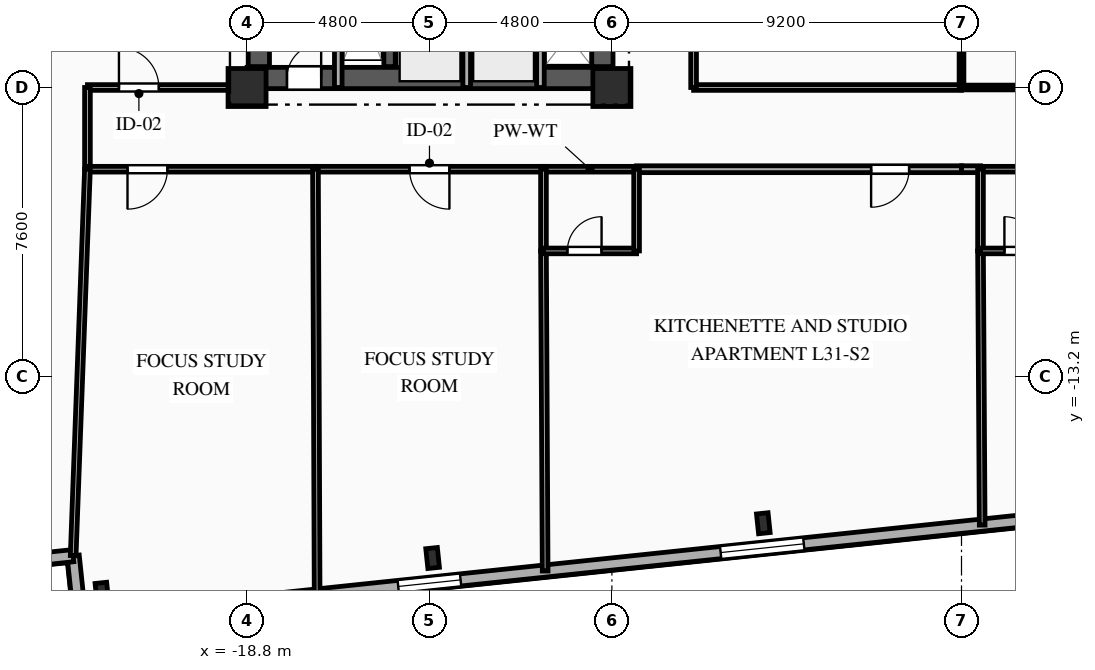
"""IFC4 building model, lengths in metres.
Left out: names, types, materials, properties, quantities, classifications, styles, units other than length and angle.
Written with IfcOpenShell. Run it as: python <this file> out.ifc"""

import sys

from ifc_helpers import new_model, si_unit, direction, frame, frame_2d, origin, origin_2d, place, context, subcontext, project, spatial, rectangle, i_section, extrude, element, fill, save


model = new_model("IFC4")
c1 = context("Model", 3, precision=1e-05, world=origin(), true_north=direction((0.0, 1.0)))
c2 = subcontext(c1, "Body", "Model", "MODEL_VIEW")
j1 = project(units=[si_unit("LENGTHUNIT", "METRE"), si_unit("PLANEANGLEUNIT", "RADIAN")], contexts=[c1])
p1 = place(None, origin())
s1 = spatial("IfcSite", under=j1, at=p1, CompositionType="ELEMENT")
p2 = place(p1, origin())
s2 = spatial("IfcBuilding", under=s1, at=p2, CompositionType="ELEMENT")
p3 = place(p2, frame((0.0, 0.0, 112.5)))
s3 = spatial("IfcBuildingStorey", under=s2, at=p3, CompositionType="ELEMENT", Elevation=112.5)
for number, where, z_axis, x_axis in (
    (1, (-18.8, -5.6, 0.0), (0.0, 0.0, 1.0), (1.0, 0.0, 0.0)),
    (2, (-9.2, -5.6, 0.0), (0.0, 0.0, 1.0), (1.0, 0.0, 0.0)),
):
    element("IfcColumn", number, at=place(p3, frame(where, z_axis=z_axis, x_axis=x_axis)), inside=s3, PredefinedType="COLUMN", context=c2, shape_type="SweptSolid", body=[
        extrude(rectangle(XDim=1.0, YDim=1.0, at=origin_2d()), origin(), (0.0, 0.0, 1.0), 3.35),
    ])
for number, where, z_axis, x_axis in (
    (3, (-22.619, -18.895, 0.0), (0.0, 0.0, 1.0), (0.995, 0.105, 0.0)),
    (4, (-13.917, -17.98, 0.0), (0.0, 0.0, 1.0), (0.995, 0.105, 0.0)),
    (5, (-5.215, -17.066, 0.0), (0.0, 0.0, 1.0), (0.995, 0.105, 0.0)),
):
    element("IfcColumn", number, at=place(p3, frame(where, z_axis=z_axis, x_axis=x_axis)), inside=s3, PredefinedType="COLUMN", context=c2, shape_type="SweptSolid", body=[
        extrude(i_section(OverallWidth=0.306, OverallDepth=0.524, WebThickness=0.021, FlangeThickness=0.04, FilletRadius=0.027, at=origin_2d()), origin(), (0.0, 0.0, 1.0), 3.35),
    ])
for number, where, z_axis, x_axis in (
    (6, (-23.198, -19.609, 0.0), (0.0, 0.0, 1.0), (-0.105, 0.995, 0.0)),
    (7, (-23.376, -17.919, 0.0), (0.0, 0.0, 1.0), (-0.995, -0.105, 0.0)),
):
    element("IfcWall", number, at=place(p3, frame(where, z_axis=z_axis, x_axis=x_axis)), inside=s3, PredefinedType="SOLIDWALL", context=c2, shape_type="SweptSolid", body=[
        extrude(rectangle(XDim=1.7, YDim=0.32, at=frame_2d((0.85, 0.0))), origin(), (0.0, 0.0, 1.0), 3.045),
    ])
p4 = place(p3, frame((30.307, -13.986, 0.0), z_axis=(0.0, 0.0, 1.0), x_axis=(-0.994521628355, -0.104531003701, 0.0)))
e8 = element("IfcWall", 8, at=p4, inside=s3, PredefinedType="SOLIDWALL", context=c2, shape_type="SweptSolid", body=[
    extrude(rectangle(XDim=53.8, YDim=0.32, at=frame_2d((26.9, 0.0))), origin(), (0.0, 0.0, 1.0), 3.045),
])
p5 = place(p4, frame((3.098, 0.0, 0.85)))
e9 = element("IfcOpeningElement", 9, at=p5, cuts=e8, PredefinedType="OPENING", context=c2, shape_type="SweptSolid", body=[
    extrude(rectangle(XDim=1.65, YDim=1.85, at=frame_2d((0.825, 0.925))), frame((0.0, 0.17, 0.0), z_axis=(0.0, -1.0, 0.0), x_axis=(1.0, 0.0, 0.0)), (0.0, 0.0, 1.0), 0.34),
])
p6 = place(p4, frame((9.302, 0.0, 0.85)))
e10 = element("IfcOpeningElement", 10, at=p6, cuts=e8, PredefinedType="OPENING", context=c2, shape_type="SweptSolid", body=[
    extrude(rectangle(XDim=1.65, YDim=1.85, at=frame_2d((0.825, 0.925))), frame((0.0, 0.17, 0.0), z_axis=(0.0, -1.0, 0.0), x_axis=(1.0, 0.0, 0.0)), (0.0, 0.0, 1.0), 0.34),
])
p7 = place(p4, frame((14.827, 0.0, 0.85)))
e11 = element("IfcOpeningElement", 11, at=p7, cuts=e8, PredefinedType="OPENING", context=c2, shape_type="SweptSolid", body=[
    extrude(rectangle(XDim=1.65, YDim=1.85, at=frame_2d((0.825, 0.925))), frame((0.0, 0.17, 0.0), z_axis=(0.0, -1.0, 0.0), x_axis=(1.0, 0.0, 0.0)), (0.0, 0.0, 1.0), 0.34),
])
p8 = place(p4, frame((23.078, 0.0, 0.85)))
e12 = element("IfcOpeningElement", 12, at=p8, cuts=e8, PredefinedType="OPENING", context=c2, shape_type="SweptSolid", body=[
    extrude(rectangle(XDim=2.2, YDim=1.85, at=frame_2d((1.1, 0.925))), frame((0.0, 0.17, 0.0), z_axis=(0.0, -1.0, 0.0), x_axis=(1.0, 0.0, 0.0)), (0.0, 0.0, 1.0), 0.34),
])
p9 = place(p4, frame((34.646, 0.0, 0.85)))
e13 = element("IfcOpeningElement", 13, at=p9, cuts=e8, PredefinedType="OPENING", context=c2, shape_type="SweptSolid", body=[
    extrude(rectangle(XDim=2.2, YDim=1.85, at=frame_2d((1.1, 0.925))), frame((0.0, 0.17, 0.0), z_axis=(0.0, -1.0, 0.0), x_axis=(1.0, 0.0, 0.0)), (0.0, 0.0, 1.0), 0.34),
])
p10 = place(p4, frame((43.728, 0.0, 0.85)))
e14 = element("IfcOpeningElement", 14, at=p10, cuts=e8, PredefinedType="OPENING", context=c2, shape_type="SweptSolid", body=[
    extrude(rectangle(XDim=1.65, YDim=1.85, at=frame_2d((0.825, 0.925))), frame((0.0, 0.17, 0.0), z_axis=(0.0, -1.0, 0.0), x_axis=(1.0, 0.0, 0.0)), (0.0, 0.0, 1.0), 0.34),
])
p11 = place(p4, frame((49.653, 0.0, 0.85)))
e15 = element("IfcOpeningElement", 15, at=p11, cuts=e8, PredefinedType="OPENING", context=c2, shape_type="SweptSolid", body=[
    extrude(rectangle(XDim=1.65, YDim=1.85, at=frame_2d((0.825, 0.925))), frame((0.0, 0.17, 0.0), z_axis=(0.0, -1.0, 0.0), x_axis=(1.0, 0.0, 0.0)), (0.0, 0.0, 1.0), 0.34),
])
p12 = place(p3, frame((-18.8, -5.35, 0.0), z_axis=(0.0, 0.0, 1.0), x_axis=(1.0, 0.0, 0.0)))
e16 = element("IfcWall", 16, at=p12, inside=s3, PredefinedType="SHEAR", context=c2, shape_type="SweptSolid", body=[
    extrude(rectangle(XDim=9.6, YDim=0.56, at=frame_2d((4.8, 0.0))), origin(), (0.0, 0.0, 1.0), 3.045),
])
p13 = place(p12, frame((1.05, 0.0, 0.0)))
e17 = element("IfcOpeningElement", 17, at=p13, cuts=e16, PredefinedType="OPENING", context=c2, shape_type="SweptSolid", body=[
    extrude(rectangle(XDim=0.9, YDim=2.1, at=frame_2d((0.45, 1.05))), frame((0.0, 0.29, 0.0), z_axis=(0.0, -1.0, 0.0), x_axis=(1.0, 0.0, 0.0)), (0.0, 0.0, 1.0), 0.58),
])
p14 = place(p3, frame((-18.49, -5.05, 0.0), z_axis=(0.0, 0.0, 1.0), x_axis=(0.0, 1.0, 0.0)))
e18 = element("IfcWall", 18, at=p14, inside=s3, PredefinedType="SHEAR", context=c2, shape_type="SweptSolid", body=[
    extrude(rectangle(XDim=10.1, YDim=0.56, at=frame_2d((5.05, 0.0))), origin(), (0.0, 0.0, 1.0), 3.045),
])
p15 = place(p3, frame((-9.45, -5.05, 0.0), z_axis=(0.0, 0.0, 1.0), x_axis=(0.0, 1.0, 0.0)))
e19 = element("IfcWall", 19, at=p15, inside=s3, PredefinedType="SHEAR", context=c2, shape_type="SweptSolid", body=[
    extrude(rectangle(XDim=10.1, YDim=0.56, at=frame_2d((5.05, 0.0))), origin(), (0.0, 0.0, 1.0), 3.045),
])
p16 = place(p15, frame((7.15, 0.0, 0.0)))
e20 = element("IfcOpeningElement", 20, at=p16, cuts=e19, PredefinedType="OPENING", context=c2, shape_type="SweptSolid", body=[
    extrude(rectangle(XDim=0.9, YDim=2.1, at=frame_2d((0.45, 1.05))), frame((0.0, 0.29, 0.0), z_axis=(0.0, -1.0, 0.0), x_axis=(1.0, 0.0, 0.0)), (0.0, 0.0, 1.0), 0.58),
])
p17 = place(p15, frame((2.4, 0.0, 0.0)))
e21 = element("IfcOpeningElement", 21, at=p17, cuts=e19, PredefinedType="OPENING", context=c2, shape_type="SweptSolid", body=[
    extrude(rectangle(XDim=1.2, YDim=2.15, at=frame_2d((0.6, 1.075))), frame((0.0, 0.29, 0.0), z_axis=(0.0, -1.0, 0.0), x_axis=(1.0, 0.0, 0.0)), (0.0, 0.0, 1.0), 0.58),
])
p18 = place(p3, frame((-15.05, -5.05, 0.0), z_axis=(0.0, 0.0, 1.0), x_axis=(0.0, 1.0, 0.0)))
e22 = element("IfcWall", 22, at=p18, inside=s3, PredefinedType="SHEAR", context=c2, shape_type="SweptSolid", body=[
    extrude(rectangle(XDim=10.1, YDim=0.3, at=frame_2d((5.05, 0.0))), origin(), (0.0, 0.0, 1.0), 3.045),
])
p19 = place(p3, frame((-16.4, -5.6, 0.0), z_axis=(0.0, 0.0, 1.0), x_axis=(0.0, 1.0, 0.0)))
e23 = element("IfcWall", 23, at=p19, inside=s3, PredefinedType="PARTITIONING", context=c2, shape_type="SweptSolid", body=[
    extrude(rectangle(XDim=3.49, YDim=0.2, at=frame_2d((1.745, 0.0))), origin(), (0.0, 0.0, 1.0), 3.045),
])
for number, where, z_axis, x_axis in (
    (24, (-13.02, -5.6, 0.0), (0.0, 0.0, 1.0), (0.0, 1.0, 0.0)),
    (25, (-11.08, -5.6, 0.0), (0.0, 0.0, 1.0), (0.0, 1.0, 0.0)),
):
    element("IfcWall", number, at=place(p3, frame(where, z_axis=z_axis, x_axis=x_axis)), inside=s3, PredefinedType="PARTITIONING", context=c2, shape_type="SweptSolid", body=[
        extrude(rectangle(XDim=2.25, YDim=0.2, at=frame_2d((1.125, 0.0))), origin(), (0.0, 0.0, 1.0), 3.045),
    ])
p20 = place(p3, frame((-23.0, -5.6, 0.0), z_axis=(0.0, 0.0, 1.0), x_axis=(1.0, 0.0, 0.0)))
e26 = element("IfcWall", 26, at=p20, inside=s3, PredefinedType="PARTITIONING", context=c2, shape_type="SweptSolid", body=[
    extrude(rectangle(XDim=4.2, YDim=0.15, at=frame_2d((2.1, 0.0))), origin(), (0.0, 0.0, 1.0), 3.045),
])
p21 = place(p20, frame((0.829, 0.0, 0.0)))
e27 = element("IfcOpeningElement", 27, at=p21, cuts=e26, PredefinedType="OPENING", context=c2, shape_type="SweptSolid", body=[
    extrude(rectangle(XDim=1.05, YDim=2.15, at=frame_2d((0.525, 1.075))), frame((0.0, 0.085, 0.0), z_axis=(0.0, -1.0, 0.0), x_axis=(1.0, 0.0, 0.0)), (0.0, 0.0, 1.0), 0.17),
])
p22 = place(p3, frame((-23.0, -7.75, 0.0), z_axis=(0.0, 0.0, 1.0), x_axis=(0.0, 1.0, 0.0)))
e28 = element("IfcWall", 28, at=p22, inside=s3, PredefinedType="PARTITIONING", context=c2, shape_type="SweptSolid", body=[
    extrude(rectangle(XDim=2.15, YDim=0.15, at=frame_2d((1.075, 0.0))), origin(), (0.0, 0.0, 1.0), 2.7),
])
p23 = place(p3, frame((-17.0, -7.75, 0.0), z_axis=(0.0, 0.0, 1.0), x_axis=(-1.0, 0.0, 0.0)))
e29 = element("IfcWall", 29, at=p23, inside=s3, PredefinedType="PARTITIONING", context=c2, shape_type="SweptSolid", body=[
    extrude(rectangle(XDim=6.0, YDim=0.15, at=frame_2d((3.0, 0.0))), origin(), (0.0, 0.0, 1.0), 3.045),
])
p24 = place(p23, frame((3.896, 0.0, 0.0)))
e30 = element("IfcOpeningElement", 30, at=p24, cuts=e29, PredefinedType="OPENING", context=c2, shape_type="SweptSolid", body=[
    extrude(rectangle(XDim=1.05, YDim=2.15, at=frame_2d((0.525, 1.075))), frame((0.0, 0.085, 0.0), z_axis=(0.0, -1.0, 0.0), x_axis=(1.0, 0.0, 0.0)), (0.0, 0.0, 1.0), 0.17),
])
p25 = place(p3, frame((-11.0, -7.75, 0.0), z_axis=(0.0, 0.0, 1.0), x_axis=(-1.0, 0.0, 0.0)))
e31 = element("IfcWall", 31, at=p25, inside=s3, PredefinedType="PARTITIONING", context=c2, shape_type="SweptSolid", body=[
    extrude(rectangle(XDim=6.0, YDim=0.15, at=frame_2d((3.0, 0.0))), origin(), (0.0, 0.0, 1.0), 3.045),
])
p26 = place(p25, frame((2.475, 0.0, 0.0)))
e32 = element("IfcOpeningElement", 32, at=p26, cuts=e31, PredefinedType="OPENING", context=c2, shape_type="SweptSolid", body=[
    extrude(rectangle(XDim=1.05, YDim=2.15, at=frame_2d((0.525, 1.075))), frame((0.0, 0.085, 0.0), z_axis=(0.0, -1.0, 0.0), x_axis=(1.0, 0.0, 0.0)), (0.0, 0.0, 1.0), 0.17),
])
p27 = place(p3, frame((0.0, -7.75, 0.0), z_axis=(0.0, 0.0, 1.0), x_axis=(-1.0, 0.0, 0.0)))
e33 = element("IfcWall", 33, at=p27, inside=s3, PredefinedType="PARTITIONING", context=c2, shape_type="SweptSolid", body=[
    extrude(rectangle(XDim=8.55, YDim=0.18, at=frame_2d((4.275, 0.0))), origin(), (0.0, 0.0, 1.0), 3.045),
])
p28 = place(p27, frame((1.379, 0.0, 0.0)))
e34 = element("IfcOpeningElement", 34, at=p28, cuts=e33, PredefinedType="OPENING", context=c2, shape_type="SweptSolid", body=[
    extrude(rectangle(XDim=1.0, YDim=2.15, at=frame_2d((0.5, 1.075))), frame((0.0, 0.1, 0.0), z_axis=(0.0, -1.0, 0.0), x_axis=(1.0, 0.0, 0.0)), (0.0, 0.0, 1.0), 0.2),
])
p29 = place(p3, frame((-8.55, -7.75, 0.0), z_axis=(0.0, 0.0, 1.0), x_axis=(-1.0, 0.0, 0.0)))
e35 = element("IfcWall", 35, at=p29, inside=s3, PredefinedType="PLUMBINGWALL", context=c2, shape_type="SweptSolid", body=[
    extrude(rectangle(XDim=2.45, YDim=0.15, at=frame_2d((1.225, 0.0))), origin(), (0.0, 0.0, 1.0), 3.045),
])
p30 = place(p3, frame((-7.05, -5.6, 0.0), z_axis=(0.0, 0.0, 1.0), x_axis=(1.0, 0.0, 0.0)))
e36 = element("IfcWall", 36, at=p30, inside=s3, PredefinedType="PARTITIONING", context=c2, shape_type="SweptSolid", body=[
    extrude(rectangle(XDim=7.05, YDim=0.15, at=frame_2d((3.525, 0.0))), origin(), (0.0, 0.0, 1.0), 2.53),
])
p31 = place(p3, frame((0.5, -7.75, 0.0), z_axis=(0.0, 0.0, 1.0), x_axis=(-1.0, 0.0, 0.0)))
e37 = element("IfcWall", 37, at=p31, inside=s3, PredefinedType="PARTITIONING", context=c2, shape_type="SweptSolid", body=[
    extrude(rectangle(XDim=0.5, YDim=0.18, at=frame_2d((0.25, 0.0))), origin(), (0.0, 0.0, 1.0), 3.045),
])
p32 = place(p3, frame((2.95, -7.75, 0.0), z_axis=(0.0, 0.0, 1.0), x_axis=(-1.0, 0.0, 0.0)))
e38 = element("IfcWall", 38, at=p32, inside=s3, PredefinedType="PLUMBINGWALL", context=c2, shape_type="SweptSolid", body=[
    extrude(rectangle(XDim=2.45, YDim=0.15, at=frame_2d((1.225, 0.0))), origin(), (0.0, 0.0, 1.0), 3.045),
])
p33 = place(p3, frame((0.0, -5.6, 0.0), z_axis=(0.0, 0.0, 1.0), x_axis=(1.0, 0.0, 0.0)))
e39 = element("IfcWall", 39, at=p33, inside=s3, PredefinedType="PARTITIONING", context=c2, shape_type="SweptSolid", body=[
    extrude(rectangle(XDim=7.05, YDim=0.125, at=frame_2d((3.525, 0.0))), origin(), (0.0, 0.0, 1.0), 2.53),
])
p34 = place(p3, frame((-7.05, 8.5, 0.0), z_axis=(0.0, 0.0, 1.0), x_axis=(0.0, -1.0, 0.0)))
e40 = element("IfcWall", 40, at=p34, inside=s3, PredefinedType="PARTITIONING", context=c2, shape_type="SweptSolid", body=[
    extrude(rectangle(XDim=14.1, YDim=0.15, at=frame_2d((7.05, 0.0))), origin(), (0.0, 0.0, 1.0), 3.045),
])
p35 = place(p34, frame((8.074, 0.0, 0.0)))
e41 = element("IfcOpeningElement", 41, at=p35, cuts=e40, PredefinedType="OPENING", context=c2, shape_type="SweptSolid", body=[
    extrude(rectangle(XDim=0.95, YDim=2.1, at=frame_2d((0.475, 1.05))), frame((0.0, 0.085, 0.0), z_axis=(0.0, -1.0, 0.0), x_axis=(1.0, 0.0, 0.0)), (0.0, 0.0, 1.0), 0.17),
])
p36 = place(p3, frame((-23.0, -7.75, 0.0), z_axis=(0.0, 0.0, 1.0), x_axis=(-0.036924695214, -0.999318050914, 0.0)))
e42 = element("IfcWall", 42, at=p36, inside=s3, PredefinedType="PARTITIONING", context=c2, shape_type="SweptSolid", body=[
    extrude(rectangle(XDim=10.176, YDim=0.15, at=frame_2d((5.088, 0.0))), origin(), (0.0, 0.0, 1.0), 3.045),
])
p37 = place(p3, frame((-17.0, -7.75, 0.0), z_axis=(0.0, 0.0, 1.0), x_axis=(0.003922478487, -0.999992307052, 0.0)))
e43 = element("IfcWall", 43, at=p37, inside=s3, PredefinedType="PARTITIONING", context=c2, shape_type="SweptSolid", body=[
    extrude(rectangle(XDim=11.203, YDim=0.15, at=frame_2d((5.602, 0.0))), origin(), (0.0, 0.0, 1.0), 3.045),
])
p38 = place(p3, frame((-11.0, -9.9, 0.0), z_axis=(0.0, 0.0, 1.0), x_axis=(0.005217320294, -0.999986389692, 0.0)))
e44 = element("IfcWall", 44, at=p38, inside=s3, PredefinedType="PARTITIONING", context=c2, shape_type="SweptSolid", body=[
    extrude(rectangle(XDim=8.423, YDim=0.15, at=frame_2d((4.211, 0.0))), origin(), (0.0, 0.0, 1.0), 3.045),
])
p39 = place(p3, frame((-11.0, -7.75, 0.0), z_axis=(0.0, 0.0, 1.0), x_axis=(0.0, -1.0, 0.0)))
e45 = element("IfcWall", 45, at=p39, inside=s3, PredefinedType="PLUMBINGWALL", context=c2, shape_type="SweptSolid", body=[
    extrude(rectangle(XDim=2.15, YDim=0.15, at=frame_2d((1.075, 0.0))), origin(), (0.0, 0.0, 1.0), 3.045),
])
p40 = place(p3, frame((-11.0, -9.9, 0.0), z_axis=(0.0, 0.0, 1.0), x_axis=(1.0, 0.0, 0.0)))
e46 = element("IfcWall", 46, at=p40, inside=s3, PredefinedType="PLUMBINGWALL", context=c2, shape_type="SweptSolid", body=[
    extrude(rectangle(XDim=2.45, YDim=0.15, at=frame_2d((1.225, 0.0))), origin(), (0.0, 0.0, 1.0), 3.045),
])
p41 = place(p40, frame((0.629, 0.0, 0.0)))
e47 = element("IfcOpeningElement", 47, at=p41, cuts=e46, PredefinedType="OPENING", context=c2, shape_type="SweptSolid", body=[
    extrude(rectangle(XDim=0.9, YDim=2.1, at=frame_2d((0.45, 1.05))), frame((0.0, 0.085, 0.0), z_axis=(0.0, -1.0, 0.0), x_axis=(1.0, 0.0, 0.0)), (0.0, 0.0, 1.0), 0.17),
])
p42 = place(p3, frame((-8.55, -9.9, 0.0), z_axis=(0.0, 0.0, 1.0), x_axis=(0.0, 1.0, 0.0)))
e48 = element("IfcWall", 48, at=p42, inside=s3, PredefinedType="PLUMBINGWALL", context=c2, shape_type="SweptSolid", body=[
    extrude(rectangle(XDim=2.15, YDim=0.15, at=frame_2d((1.075, 0.0))), origin(), (0.0, 0.0, 1.0), 3.045),
])
p43 = place(p3, frame((0.5, -9.9, 0.0), z_axis=(0.0, 0.0, 1.0), x_axis=(0.006091463685, -0.999981446863, 0.0)))
e49 = element("IfcWall", 49, at=p43, inside=s3, PredefinedType="PARTITIONING", context=c2, shape_type="SweptSolid", body=[
    extrude(rectangle(XDim=7.214, YDim=0.15, at=frame_2d((3.607, 0.0))), origin(), (0.0, 0.0, 1.0), 3.045),
])
p44 = place(p3, frame((0.5, -7.75, 0.0), z_axis=(0.0, 0.0, 1.0), x_axis=(0.0, -1.0, 0.0)))
e50 = element("IfcWall", 50, at=p44, inside=s3, PredefinedType="PLUMBINGWALL", context=c2, shape_type="SweptSolid", body=[
    extrude(rectangle(XDim=2.15, YDim=0.15, at=frame_2d((1.075, 0.0))), origin(), (0.0, 0.0, 1.0), 3.045),
])
p45 = place(p3, frame((0.5, -9.9, 0.0), z_axis=(0.0, 0.0, 1.0), x_axis=(1.0, 0.0, 0.0)))
e51 = element("IfcWall", 51, at=p45, inside=s3, PredefinedType="PLUMBINGWALL", context=c2, shape_type="SweptSolid", body=[
    extrude(rectangle(XDim=2.45, YDim=0.15, at=frame_2d((1.225, 0.0))), origin(), (0.0, 0.0, 1.0), 3.045),
])
p46 = place(p45, frame((0.629, 0.0, 0.0)))
e52 = element("IfcOpeningElement", 52, at=p46, cuts=e51, PredefinedType="OPENING", context=c2, shape_type="SweptSolid", body=[
    extrude(rectangle(XDim=0.9, YDim=2.1, at=frame_2d((0.45, 1.05))), frame((0.0, 0.085, 0.0), z_axis=(0.0, -1.0, 0.0), x_axis=(1.0, 0.0, 0.0)), (0.0, 0.0, 1.0), 0.17),
])
p47 = place(p3, frame((0.0, 8.5, 0.0), z_axis=(0.0, 0.0, 1.0), x_axis=(0.0, -1.0, 0.0)))
e53 = element("IfcWall", 53, at=p47, inside=s3, PredefinedType="PARTITIONING", context=c2, shape_type="SweptSolid", body=[
    extrude(rectangle(XDim=14.1, YDim=0.125, at=frame_2d((7.05, 0.0))), origin(), (0.0, 0.0, 1.0), 3.045),
])
p48 = place(p9, origin())
e54 = element("IfcWindow", 54, at=p48, inside=s3, PartitioningType="SINGLE_PANEL", PredefinedType="WINDOW", context=c2, shape_type="SweptSolid", body=[
    extrude(rectangle(XDim=2.2, YDim=1.85, at=frame_2d((1.1, 0.925))), frame((0.0, 0.03, 0.0), z_axis=(0.0, -1.0, 0.0), x_axis=(1.0, 0.0, 0.0)), (0.0, 0.0, 1.0), 0.06),
])
fill(e13, e54)
p49 = place(p10, origin())
e55 = element("IfcWindow", 55, at=p49, inside=s3, PartitioningType="SINGLE_PANEL", PredefinedType="WINDOW", context=c2, shape_type="SweptSolid", body=[
    extrude(rectangle(XDim=1.65, YDim=1.85, at=frame_2d((0.825, 0.925))), frame((0.0, 0.03, 0.0), z_axis=(0.0, -1.0, 0.0), x_axis=(1.0, 0.0, 0.0)), (0.0, 0.0, 1.0), 0.06),
])
fill(e14, e55)
p50 = place(p13, origin())
e56 = element("IfcDoor", 56, at=p50, inside=s3, OperationType="SINGLE_SWING_RIGHT", PredefinedType="DOOR", context=c2, shape_type="SweptSolid", body=[
    extrude(rectangle(XDim=0.9, YDim=2.1, at=frame_2d((0.45, 1.05))), frame((0.0, 0.025, 0.0), z_axis=(0.0, -1.0, 0.0), x_axis=(1.0, 0.0, 0.0)), (0.0, 0.0, 1.0), 0.05),
])
fill(e17, e56)
p51 = place(p21, origin())
e57 = element("IfcDoor", 57, at=p51, inside=s3, OperationType="SINGLE_SWING_LEFT", PredefinedType="DOOR", context=c2, shape_type="SweptSolid", body=[
    extrude(rectangle(XDim=1.05, YDim=2.15, at=frame_2d((0.525, 1.075))), frame((0.0, 0.025, 0.0), z_axis=(0.0, -1.0, 0.0), x_axis=(1.0, 0.0, 0.0)), (0.0, 0.0, 1.0), 0.05),
])
fill(e27, e57)
p52 = place(p24, origin())
e58 = element("IfcDoor", 58, at=p52, inside=s3, OperationType="SINGLE_SWING_RIGHT", PredefinedType="DOOR", context=c2, shape_type="SweptSolid", body=[
    extrude(rectangle(XDim=1.05, YDim=2.15, at=frame_2d((0.525, 1.075))), frame((0.0, 0.025, 0.0), z_axis=(0.0, -1.0, 0.0), x_axis=(1.0, 0.0, 0.0)), (0.0, 0.0, 1.0), 0.05),
])
fill(e30, e58)
p53 = place(p26, origin())
e59 = element("IfcDoor", 59, at=p53, inside=s3, OperationType="SINGLE_SWING_LEFT", PredefinedType="DOOR", context=c2, shape_type="SweptSolid", body=[
    extrude(rectangle(XDim=1.05, YDim=2.15, at=frame_2d((0.525, 1.075))), frame((0.0, 0.025, 0.0), z_axis=(0.0, -1.0, 0.0), x_axis=(1.0, 0.0, 0.0)), (0.0, 0.0, 1.0), 0.05),
])
fill(e32, e59)
p54 = place(p28, origin())
e60 = element("IfcDoor", 60, at=p54, inside=s3, OperationType="SINGLE_SWING_RIGHT", PredefinedType="DOOR", context=c2, shape_type="SweptSolid", body=[
    extrude(rectangle(XDim=1.0, YDim=2.15, at=frame_2d((0.5, 1.075))), frame((0.0, 0.025, 0.0), z_axis=(0.0, -1.0, 0.0), x_axis=(1.0, 0.0, 0.0)), (0.0, 0.0, 1.0), 0.05),
])
fill(e34, e60)
p55 = place(p41, origin())
e61 = element("IfcDoor", 61, at=p55, inside=s3, OperationType="SINGLE_SWING_RIGHT", PredefinedType="DOOR", context=c2, shape_type="SweptSolid", body=[
    extrude(rectangle(XDim=0.9, YDim=2.1, at=frame_2d((0.45, 1.05))), frame((0.0, 0.025, 0.0), z_axis=(0.0, -1.0, 0.0), x_axis=(1.0, 0.0, 0.0)), (0.0, 0.0, 1.0), 0.05),
])
fill(e47, e61)
p56 = place(p46, origin())
e62 = element("IfcDoor", 62, at=p56, inside=s3, OperationType="SINGLE_SWING_LEFT", PredefinedType="DOOR", context=c2, shape_type="SweptSolid", body=[
    extrude(rectangle(XDim=0.9, YDim=2.1, at=frame_2d((0.45, 1.05))), frame((0.0, 0.025, 0.0), z_axis=(0.0, -1.0, 0.0), x_axis=(1.0, 0.0, 0.0)), (0.0, 0.0, 1.0), 0.05),
])
fill(e52, e62)
save(model, sys.argv[1])
